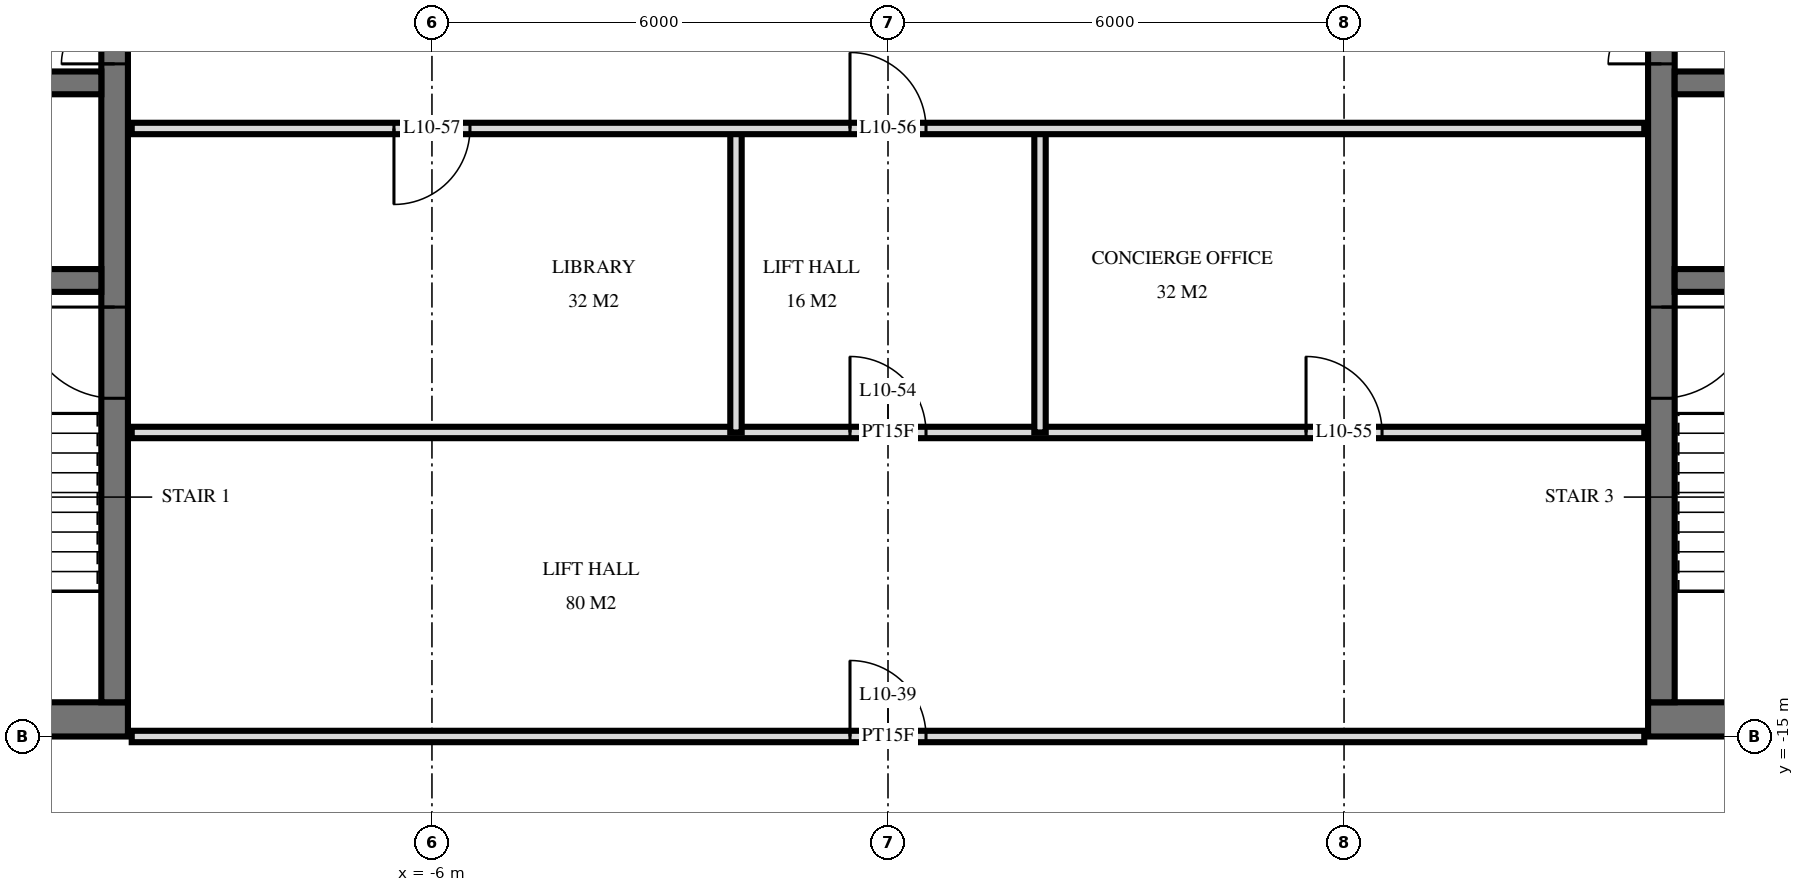
"""IFC4 building model, lengths in metres.
Left out: names, types, materials, properties, quantities, classifications, styles, units other than length and angle.
Written with IfcOpenShell. Run it as: python <this file> out.ifc"""

import sys

from ifc_helpers import new_model, si_unit, direction, frame, frame_2d, origin, place, context, subcontext, project, spatial, rectangle, extrude, element, fill, save


model = new_model("IFC4")
c1 = context("Model", 3, precision=1e-05, world=origin(), true_north=direction((0.0, 1.0)))
c2 = subcontext(c1, "Body", "Model", "MODEL_VIEW")
j1 = project(units=[si_unit("LENGTHUNIT", "METRE"), si_unit("PLANEANGLEUNIT", "RADIAN")], contexts=[c1])
p1 = place(None, origin())
s1 = spatial("IfcSite", under=j1, at=p1, CompositionType="ELEMENT")
p2 = place(p1, origin())
s2 = spatial("IfcBuilding", under=s1, at=p2, CompositionType="ELEMENT")
p3 = place(p2, frame((0.0, 0.0, 45.6)))
s3 = spatial("IfcBuildingStorey", under=s2, at=p3, CompositionType="ELEMENT", Elevation=45.6)
p4 = place(p3, frame((-29.5, -14.775, 0.0), z_axis=(0.0, 0.0, 1.0), x_axis=(1.0, 0.0, 0.0)))
e1 = element("IfcWall", 1, at=p4, inside=s3, PredefinedType="SHEAR", context=c2, shape_type="SweptSolid", body=[
    extrude(rectangle(XDim=19.5, YDim=0.45, at=frame_2d((9.75, 0.0))), origin(), (0.0, 0.0, 1.0), 3.6),
])
p5 = place(p4, frame((11.2, 0.0, 0.0)))
e2 = element("IfcOpeningElement", 2, at=p5, cuts=e1, PredefinedType="OPENING", context=c2, shape_type="SweptSolid", body=[
    extrude(rectangle(XDim=1.2, YDim=2.1, at=frame_2d((0.6, 1.05))), frame((0.0, 0.235, 0.0), z_axis=(0.0, -1.0, 0.0), x_axis=(1.0, 0.0, 0.0)), (0.0, 0.0, 1.0), 0.47),
])
p6 = place(p4, frame((14.25, 0.0, 0.0)))
e3 = element("IfcOpeningElement", 3, at=p6, cuts=e1, PredefinedType="OPENING", context=c2, shape_type="SweptSolid", body=[
    extrude(rectangle(XDim=1.1, YDim=2.1, at=frame_2d((0.55, 1.05))), frame((0.0, 0.235, 0.0), z_axis=(0.0, -1.0, 0.0), x_axis=(1.0, 0.0, 0.0)), (0.0, 0.0, 1.0), 0.47),
])
p7 = place(p4, frame((8.5, 0.0, 0.0)))
e4 = element("IfcOpeningElement", 4, at=p7, cuts=e1, PredefinedType="OPENING", context=c2, shape_type="SweptSolid", body=[
    extrude(rectangle(XDim=0.9, YDim=2.1, at=frame_2d((0.45, 1.05))), frame((0.0, 0.235, 0.0), z_axis=(0.0, -1.0, 0.0), x_axis=(1.0, 0.0, 0.0)), (0.0, 0.0, 1.0), 0.47),
])
p8 = place(p4, frame((6.05, 0.0, 0.0)))
e5 = element("IfcOpeningElement", 5, at=p8, cuts=e1, PredefinedType="OPENING", context=c2, shape_type="SweptSolid", body=[
    extrude(rectangle(XDim=1.0, YDim=2.1, at=frame_2d((0.5, 1.05))), frame((0.0, 0.235, 0.0), z_axis=(0.0, -1.0, 0.0), x_axis=(1.0, 0.0, 0.0)), (0.0, 0.0, 1.0), 0.47),
])
p9 = place(p4, frame((3.587, 0.0, 0.0)))
e6 = element("IfcOpeningElement", 6, at=p9, cuts=e1, PredefinedType="OPENING", context=c2, shape_type="SweptSolid", body=[
    extrude(rectangle(XDim=1.0, YDim=2.1, at=frame_2d((0.5, 1.05))), frame((0.0, 0.235, 0.0), z_axis=(0.0, -1.0, 0.0), x_axis=(1.0, 0.0, 0.0)), (0.0, 0.0, 1.0), 0.47),
])
p10 = place(p4, frame((1.85, 0.0, 0.0)))
e7 = element("IfcOpeningElement", 7, at=p10, cuts=e1, PredefinedType="OPENING", context=c2, shape_type="SweptSolid", body=[
    extrude(rectangle(XDim=1.0, YDim=2.1, at=frame_2d((0.5, 1.05))), frame((0.0, 0.235, 0.0), z_axis=(0.0, -1.0, 0.0), x_axis=(1.0, 0.0, 0.0)), (0.0, 0.0, 1.0), 0.47),
])
p11 = place(p4, frame((0.55, 0.0, 0.0)))
e8 = element("IfcOpeningElement", 8, at=p11, cuts=e1, PredefinedType="OPENING", context=c2, shape_type="SweptSolid", body=[
    extrude(rectangle(XDim=1.0, YDim=2.1, at=frame_2d((0.5, 1.05))), frame((0.0, 0.235, 0.0), z_axis=(0.0, -1.0, 0.0), x_axis=(1.0, 0.0, 0.0)), (0.0, 0.0, 1.0), 0.47),
])
p12 = place(p3, frame((-10.175, -14.55, 0.0), z_axis=(0.0, 0.0, 1.0), x_axis=(0.0, 1.0, 0.0)))
e9 = element("IfcWall", 9, at=p12, inside=s3, PredefinedType="SHEAR", context=c2, shape_type="SweptSolid", body=[
    extrude(rectangle(XDim=14.1, YDim=0.35, at=frame_2d((7.05, 0.0))), origin(), (0.0, 0.0, 1.0), 3.6),
])
p13 = place(p12, frame((8.4, 0.0, 0.0)))
e10 = element("IfcOpeningElement", 10, at=p13, cuts=e9, PredefinedType="OPENING", context=c2, shape_type="SweptSolid", body=[
    extrude(rectangle(XDim=1.4, YDim=2.4, at=frame_2d((0.7, 1.2))), frame((0.0, 0.185, 0.0), z_axis=(0.0, -1.0, 0.0), x_axis=(1.0, 0.0, 0.0)), (0.0, 0.0, 1.0), 0.37),
])
p14 = place(p12, frame((10.0, 0.0, 0.0)))
e11 = element("IfcOpeningElement", 11, at=p14, cuts=e9, PredefinedType="OPENING", context=c2, shape_type="SweptSolid", body=[
    extrude(rectangle(XDim=1.4, YDim=2.4, at=frame_2d((0.7, 1.2))), frame((0.0, 0.185, 0.0), z_axis=(0.0, -1.0, 0.0), x_axis=(1.0, 0.0, 0.0)), (0.0, 0.0, 1.0), 0.37),
])
p15 = place(p12, frame((4.0, 0.0, 0.0)))
e12 = element("IfcOpeningElement", 12, at=p15, cuts=e9, PredefinedType="OPENING", context=c2, shape_type="SweptSolid", body=[
    extrude(rectangle(XDim=1.2, YDim=2.1, at=frame_2d((0.6, 1.05))), frame((0.0, 0.185, 0.0), z_axis=(0.0, -1.0, 0.0), x_axis=(1.0, 0.0, 0.0)), (0.0, 0.0, 1.0), 0.37),
])
p16 = place(p3, frame((-29.05, -6.4, 0.0), z_axis=(0.0, 0.0, 1.0), x_axis=(1.0, 0.0, 0.0)))
e13 = element("IfcWall", 13, at=p16, inside=s3, PredefinedType="SHEAR", context=c2, shape_type="SweptSolid", body=[
    extrude(rectangle(XDim=18.7, YDim=0.3, at=frame_2d((9.35, 0.0))), origin(), (0.0, 0.0, 1.0), 3.6),
])
p17 = place(p16, frame((2.95, 0.0, 0.0)))
e14 = element("IfcOpeningElement", 14, at=p17, cuts=e13, PredefinedType="OPENING", context=c2, shape_type="SweptSolid", body=[
    extrude(rectangle(XDim=1.1, YDim=2.1, at=frame_2d((0.55, 1.05))), frame((0.0, 0.16, 0.0), z_axis=(0.0, -1.0, 0.0), x_axis=(1.0, 0.0, 0.0)), (0.0, 0.0, 1.0), 0.32),
])
p18 = place(p16, frame((0.55, 0.0, 0.0)))
e15 = element("IfcOpeningElement", 15, at=p18, cuts=e13, PredefinedType="OPENING", context=c2, shape_type="SweptSolid", body=[
    extrude(rectangle(XDim=1.1, YDim=2.1, at=frame_2d((0.55, 1.05))), frame((0.0, 0.16, 0.0), z_axis=(0.0, -1.0, 0.0), x_axis=(1.0, 0.0, 0.0)), (0.0, 0.0, 1.0), 0.32),
])
p19 = place(p16, frame((10.8, 0.0, 0.0)))
e16 = element("IfcOpeningElement", 16, at=p19, cuts=e13, PredefinedType="OPENING", context=c2, shape_type="SweptSolid", body=[
    extrude(rectangle(XDim=1.1, YDim=2.1, at=frame_2d((0.55, 1.05))), frame((0.0, 0.16, 0.0), z_axis=(0.0, -1.0, 0.0), x_axis=(1.0, 0.0, 0.0)), (0.0, 0.0, 1.0), 0.32),
])
p20 = place(p16, frame((5.6, 0.0, 0.0)))
e17 = element("IfcOpeningElement", 17, at=p20, cuts=e13, PredefinedType="OPENING", context=c2, shape_type="SweptSolid", body=[
    extrude(rectangle(XDim=1.0, YDim=2.1, at=frame_2d((0.5, 1.05))), frame((0.0, 0.16, 0.0), z_axis=(0.0, -1.0, 0.0), x_axis=(1.0, 0.0, 0.0)), (0.0, 0.0, 1.0), 0.32),
])
p21 = place(p3, frame((-29.05, -9.0, 0.0), z_axis=(0.0, 0.0, 1.0), x_axis=(1.0, 0.0, 0.0)))
e18 = element("IfcWall", 18, at=p21, inside=s3, PredefinedType="SHEAR", context=c2, shape_type="SweptSolid", body=[
    extrude(rectangle(XDim=18.7, YDim=0.3, at=frame_2d((9.35, 0.0))), origin(), (0.0, 0.0, 1.0), 3.6),
])
p22 = place(p21, frame((13.8, 0.0, 0.0)))
e19 = element("IfcOpeningElement", 19, at=p22, cuts=e18, PredefinedType="OPENING", context=c2, shape_type="SweptSolid", body=[
    extrude(rectangle(XDim=1.1, YDim=2.1, at=frame_2d((0.55, 1.05))), frame((0.0, 0.16, 0.0), z_axis=(0.0, -1.0, 0.0), x_axis=(1.0, 0.0, 0.0)), (0.0, 0.0, 1.0), 0.32),
])
p23 = place(p3, frame((10.0, -14.775, 0.0), z_axis=(0.0, 0.0, 1.0), x_axis=(1.0, 0.0, 0.0)))
e20 = element("IfcWall", 20, at=p23, inside=s3, PredefinedType="SHEAR", context=c2, shape_type="SweptSolid", body=[
    extrude(rectangle(XDim=19.5, YDim=0.45, at=frame_2d((9.75, 0.0))), origin(), (0.0, 0.0, 1.0), 3.6),
])
p24 = place(p23, frame((7.1, 0.0, 0.0)))
e21 = element("IfcOpeningElement", 21, at=p24, cuts=e20, PredefinedType="OPENING", context=c2, shape_type="SweptSolid", body=[
    extrude(rectangle(XDim=1.2, YDim=2.1, at=frame_2d((0.6, 1.05))), frame((0.0, 0.235, 0.0), z_axis=(0.0, -1.0, 0.0), x_axis=(1.0, 0.0, 0.0)), (0.0, 0.0, 1.0), 0.47),
])
p25 = place(p23, frame((4.15, 0.0, 0.0)))
e22 = element("IfcOpeningElement", 22, at=p25, cuts=e20, PredefinedType="OPENING", context=c2, shape_type="SweptSolid", body=[
    extrude(rectangle(XDim=1.1, YDim=2.1, at=frame_2d((0.55, 1.05))), frame((0.0, 0.235, 0.0), z_axis=(0.0, -1.0, 0.0), x_axis=(1.0, 0.0, 0.0)), (0.0, 0.0, 1.0), 0.47),
])
p26 = place(p23, frame((10.1, 0.0, 0.0)))
e23 = element("IfcOpeningElement", 23, at=p26, cuts=e20, PredefinedType="OPENING", context=c2, shape_type="SweptSolid", body=[
    extrude(rectangle(XDim=0.9, YDim=2.1, at=frame_2d((0.45, 1.05))), frame((0.0, 0.235, 0.0), z_axis=(0.0, -1.0, 0.0), x_axis=(1.0, 0.0, 0.0)), (0.0, 0.0, 1.0), 0.47),
])
p27 = place(p23, frame((12.45, 0.0, 0.0)))
e24 = element("IfcOpeningElement", 24, at=p27, cuts=e20, PredefinedType="OPENING", context=c2, shape_type="SweptSolid", body=[
    extrude(rectangle(XDim=1.0, YDim=2.1, at=frame_2d((0.5, 1.05))), frame((0.0, 0.235, 0.0), z_axis=(0.0, -1.0, 0.0), x_axis=(1.0, 0.0, 0.0)), (0.0, 0.0, 1.0), 0.47),
])
p28 = place(p23, frame((14.913, 0.0, 0.0)))
e25 = element("IfcOpeningElement", 25, at=p28, cuts=e20, PredefinedType="OPENING", context=c2, shape_type="SweptSolid", body=[
    extrude(rectangle(XDim=1.0, YDim=2.1, at=frame_2d((0.5, 1.05))), frame((0.0, 0.235, 0.0), z_axis=(0.0, -1.0, 0.0), x_axis=(1.0, 0.0, 0.0)), (0.0, 0.0, 1.0), 0.47),
])
p29 = place(p23, frame((16.65, 0.0, 0.0)))
e26 = element("IfcOpeningElement", 26, at=p29, cuts=e20, PredefinedType="OPENING", context=c2, shape_type="SweptSolid", body=[
    extrude(rectangle(XDim=1.0, YDim=2.1, at=frame_2d((0.5, 1.05))), frame((0.0, 0.235, 0.0), z_axis=(0.0, -1.0, 0.0), x_axis=(1.0, 0.0, 0.0)), (0.0, 0.0, 1.0), 0.47),
])
p30 = place(p23, frame((18.025, 0.0, 0.0)))
e27 = element("IfcOpeningElement", 27, at=p30, cuts=e20, PredefinedType="OPENING", context=c2, shape_type="SweptSolid", body=[
    extrude(rectangle(XDim=1.0, YDim=2.1, at=frame_2d((0.5, 1.05))), frame((0.0, 0.235, 0.0), z_axis=(0.0, -1.0, 0.0), x_axis=(1.0, 0.0, 0.0)), (0.0, 0.0, 1.0), 0.47),
])
p31 = place(p3, frame((10.175, -14.55, 0.0), z_axis=(0.0, 0.0, 1.0), x_axis=(0.0, 1.0, 0.0)))
e28 = element("IfcWall", 28, at=p31, inside=s3, PredefinedType="SHEAR", context=c2, shape_type="SweptSolid", body=[
    extrude(rectangle(XDim=14.1, YDim=0.35, at=frame_2d((7.05, 0.0))), origin(), (0.0, 0.0, 1.0), 3.6),
])
p32 = place(p31, frame((8.4, 0.0, 0.0)))
e29 = element("IfcOpeningElement", 29, at=p32, cuts=e28, PredefinedType="OPENING", context=c2, shape_type="SweptSolid", body=[
    extrude(rectangle(XDim=1.4, YDim=2.4, at=frame_2d((0.7, 1.2))), frame((0.0, 0.185, 0.0), z_axis=(0.0, -1.0, 0.0), x_axis=(1.0, 0.0, 0.0)), (0.0, 0.0, 1.0), 0.37),
])
p33 = place(p31, frame((10.0, 0.0, 0.0)))
e30 = element("IfcOpeningElement", 30, at=p33, cuts=e28, PredefinedType="OPENING", context=c2, shape_type="SweptSolid", body=[
    extrude(rectangle(XDim=1.4, YDim=2.4, at=frame_2d((0.7, 1.2))), frame((0.0, 0.185, 0.0), z_axis=(0.0, -1.0, 0.0), x_axis=(1.0, 0.0, 0.0)), (0.0, 0.0, 1.0), 0.37),
])
p34 = place(p31, frame((4.0, 0.0, 0.0)))
e31 = element("IfcOpeningElement", 31, at=p34, cuts=e28, PredefinedType="OPENING", context=c2, shape_type="SweptSolid", body=[
    extrude(rectangle(XDim=1.2, YDim=2.1, at=frame_2d((0.6, 1.05))), frame((0.0, 0.185, 0.0), z_axis=(0.0, -1.0, 0.0), x_axis=(1.0, 0.0, 0.0)), (0.0, 0.0, 1.0), 0.37),
])
p35 = place(p3, frame((10.35, -6.4, 0.0), z_axis=(0.0, 0.0, 1.0), x_axis=(1.0, 0.0, 0.0)))
e32 = element("IfcWall", 32, at=p35, inside=s3, PredefinedType="SHEAR", context=c2, shape_type="SweptSolid", body=[
    extrude(rectangle(XDim=18.7, YDim=0.3, at=frame_2d((9.35, 0.0))), origin(), (0.0, 0.0, 1.0), 3.6),
])
p36 = place(p35, frame((14.65, 0.0, 0.0)))
e33 = element("IfcOpeningElement", 33, at=p36, cuts=e32, PredefinedType="OPENING", context=c2, shape_type="SweptSolid", body=[
    extrude(rectangle(XDim=1.1, YDim=2.1, at=frame_2d((0.55, 1.05))), frame((0.0, 0.16, 0.0), z_axis=(0.0, -1.0, 0.0), x_axis=(1.0, 0.0, 0.0)), (0.0, 0.0, 1.0), 0.32),
])
p37 = place(p35, frame((17.05, 0.0, 0.0)))
e34 = element("IfcOpeningElement", 34, at=p37, cuts=e32, PredefinedType="OPENING", context=c2, shape_type="SweptSolid", body=[
    extrude(rectangle(XDim=1.1, YDim=2.1, at=frame_2d((0.55, 1.05))), frame((0.0, 0.16, 0.0), z_axis=(0.0, -1.0, 0.0), x_axis=(1.0, 0.0, 0.0)), (0.0, 0.0, 1.0), 0.32),
])
p38 = place(p35, frame((6.8, 0.0, 0.0)))
e35 = element("IfcOpeningElement", 35, at=p38, cuts=e32, PredefinedType="OPENING", context=c2, shape_type="SweptSolid", body=[
    extrude(rectangle(XDim=1.1, YDim=2.1, at=frame_2d((0.55, 1.05))), frame((0.0, 0.16, 0.0), z_axis=(0.0, -1.0, 0.0), x_axis=(1.0, 0.0, 0.0)), (0.0, 0.0, 1.0), 0.32),
])
p39 = place(p35, frame((12.1, 0.0, 0.0)))
e36 = element("IfcOpeningElement", 36, at=p39, cuts=e32, PredefinedType="OPENING", context=c2, shape_type="SweptSolid", body=[
    extrude(rectangle(XDim=1.0, YDim=2.1, at=frame_2d((0.5, 1.05))), frame((0.0, 0.16, 0.0), z_axis=(0.0, -1.0, 0.0), x_axis=(1.0, 0.0, 0.0)), (0.0, 0.0, 1.0), 0.32),
])
p40 = place(p3, frame((10.35, -9.0, 0.0), z_axis=(0.0, 0.0, 1.0), x_axis=(1.0, 0.0, 0.0)))
e37 = element("IfcWall", 37, at=p40, inside=s3, PredefinedType="SHEAR", context=c2, shape_type="SweptSolid", body=[
    extrude(rectangle(XDim=18.7, YDim=0.3, at=frame_2d((9.35, 0.0))), origin(), (0.0, 0.0, 1.0), 3.6),
])
p41 = place(p40, frame((3.8, 0.0, 0.0)))
e38 = element("IfcOpeningElement", 38, at=p41, cuts=e37, PredefinedType="OPENING", context=c2, shape_type="SweptSolid", body=[
    extrude(rectangle(XDim=1.1, YDim=2.1, at=frame_2d((0.55, 1.05))), frame((0.0, 0.16, 0.0), z_axis=(0.0, -1.0, 0.0), x_axis=(1.0, 0.0, 0.0)), (0.0, 0.0, 1.0), 0.32),
])
for number, where, z_axis, x_axis in (
    (39, (2.0, -11.0, 0.0), (0.0, 0.0, 1.0), (0.0, 1.0, 0.0)),
    (40, (-2.0, -11.0, 0.0), (0.0, 0.0, 1.0), (0.0, 1.0, 0.0)),
):
    element("IfcWall", number, at=place(p3, frame(where, z_axis=z_axis, x_axis=x_axis)), inside=s3, PredefinedType="PARTITIONING", context=c2, shape_type="SweptSolid", body=[
        extrude(rectangle(XDim=4.0, YDim=0.15, at=frame_2d((2.0, 0.0))), origin(), (0.0, 0.0, 1.0), 3.32),
    ])
p42 = place(p3, frame((-9.95, -15.0, 0.0), z_axis=(0.0, 0.0, 1.0), x_axis=(1.0, 0.0, 0.0)))
e41 = element("IfcWall", 41, at=p42, inside=s3, PredefinedType="PARTITIONING", context=c2, shape_type="SweptSolid", body=[
    extrude(rectangle(XDim=19.9, YDim=0.15, at=frame_2d((9.95, 0.0))), origin(), (0.0, 0.0, 1.0), 2.684),
])
p43 = place(p42, frame((9.45, 0.0, 0.0)))
e42 = element("IfcOpeningElement", 42, at=p43, cuts=e41, PredefinedType="OPENING", context=c2, shape_type="SweptSolid", body=[
    extrude(rectangle(XDim=1.0, YDim=2.1, at=frame_2d((0.5, 1.05))), frame((0.0, 0.085, 0.0), z_axis=(0.0, -1.0, 0.0), x_axis=(1.0, 0.0, 0.0)), (0.0, 0.0, 1.0), 0.17),
])
p44 = place(p3, frame((-9.95, -11.0, 0.0), z_axis=(0.0, 0.0, 1.0), x_axis=(1.0, 0.0, 0.0)))
e43 = element("IfcWall", 43, at=p44, inside=s3, PredefinedType="PARTITIONING", context=c2, shape_type="SweptSolid", body=[
    extrude(rectangle(XDim=19.9, YDim=0.15, at=frame_2d((9.95, 0.0))), origin(), (0.0, 0.0, 1.0), 3.32),
])
p45 = place(p44, frame((9.45, 0.0, 0.0)))
e44 = element("IfcOpeningElement", 44, at=p45, cuts=e43, PredefinedType="OPENING", context=c2, shape_type="SweptSolid", body=[
    extrude(rectangle(XDim=1.0, YDim=2.1, at=frame_2d((0.5, 1.05))), frame((0.0, 0.085, 0.0), z_axis=(0.0, -1.0, 0.0), x_axis=(1.0, 0.0, 0.0)), (0.0, 0.0, 1.0), 0.17),
])
p46 = place(p44, frame((15.45, 0.0, 0.0)))
e45 = element("IfcOpeningElement", 45, at=p46, cuts=e43, PredefinedType="OPENING", context=c2, shape_type="SweptSolid", body=[
    extrude(rectangle(XDim=1.0, YDim=2.1, at=frame_2d((0.5, 1.05))), frame((0.0, 0.085, 0.0), z_axis=(0.0, -1.0, 0.0), x_axis=(1.0, 0.0, 0.0)), (0.0, 0.0, 1.0), 0.17),
])
p47 = place(p3, frame((-9.95, -7.0, 0.0), z_axis=(0.0, 0.0, 1.0), x_axis=(1.0, 0.0, 0.0)))
e46 = element("IfcWall", 46, at=p47, inside=s3, PredefinedType="PARTITIONING", context=c2, shape_type="SweptSolid", body=[
    extrude(rectangle(XDim=19.9, YDim=0.15, at=frame_2d((9.95, 0.0))), origin(), (0.0, 0.0, 1.0), 3.32),
])
p48 = place(p47, frame((9.45, 0.0, 0.0)))
e47 = element("IfcOpeningElement", 47, at=p48, cuts=e46, PredefinedType="OPENING", context=c2, shape_type="SweptSolid", body=[
    extrude(rectangle(XDim=1.0, YDim=2.1, at=frame_2d((0.5, 1.05))), frame((0.0, 0.085, 0.0), z_axis=(0.0, -1.0, 0.0), x_axis=(1.0, 0.0, 0.0)), (0.0, 0.0, 1.0), 0.17),
])
p49 = place(p47, frame((3.45, 0.0, 0.0)))
e48 = element("IfcOpeningElement", 48, at=p49, cuts=e46, PredefinedType="OPENING", context=c2, shape_type="SweptSolid", body=[
    extrude(rectangle(XDim=1.0, YDim=2.1, at=frame_2d((0.5, 1.05))), frame((0.0, 0.085, 0.0), z_axis=(0.0, -1.0, 0.0), x_axis=(1.0, 0.0, 0.0)), (0.0, 0.0, 1.0), 0.17),
])
p50 = place(p13, origin())
e49 = element("IfcDoor", 49, at=p50, inside=s3, OperationType="DOUBLE_DOOR_SINGLE_SWING", PredefinedType="DOOR", context=c2, shape_type="SweptSolid", body=[
    extrude(rectangle(XDim=1.4, YDim=2.4, at=frame_2d((0.7, 1.2))), frame((0.0, 0.025, 0.0), z_axis=(0.0, -1.0, 0.0), x_axis=(1.0, 0.0, 0.0)), (0.0, 0.0, 1.0), 0.05),
])
fill(e10, e49)
p51 = place(p15, origin())
e50 = element("IfcDoor", 50, at=p51, inside=s3, OperationType="SINGLE_SWING_LEFT", PredefinedType="DOOR", context=c2, shape_type="SweptSolid", body=[
    extrude(rectangle(XDim=1.2, YDim=2.1, at=frame_2d((0.6, 1.05))), frame((0.0, 0.025, 0.0), z_axis=(0.0, -1.0, 0.0), x_axis=(1.0, 0.0, 0.0)), (0.0, 0.0, 1.0), 0.05),
])
fill(e12, e50)
p52 = place(p32, origin())
e51 = element("IfcDoor", 51, at=p52, inside=s3, OperationType="DOUBLE_DOOR_SINGLE_SWING", PredefinedType="DOOR", context=c2, shape_type="SweptSolid", body=[
    extrude(rectangle(XDim=1.4, YDim=2.4, at=frame_2d((0.7, 1.2))), frame((0.0, 0.025, 0.0), z_axis=(0.0, -1.0, 0.0), x_axis=(1.0, 0.0, 0.0)), (0.0, 0.0, 1.0), 0.05),
])
fill(e29, e51)
p53 = place(p34, frame((0.6, 0.0, 0.0), z_axis=(0.0, 0.0, 1.0), x_axis=(-1.0, 0.0, 0.0)))
e52 = element("IfcDoor", 52, at=p53, inside=s3, OperationType="SINGLE_SWING_RIGHT", PredefinedType="DOOR", context=c2, shape_type="SweptSolid", body=[
    extrude(rectangle(XDim=1.2, YDim=2.1, at=frame_2d((0.0, 1.05))), frame((0.0, -0.025, 0.0), z_axis=(0.0, 1.0, 0.0), x_axis=(-1.0, 0.0, 0.0)), (0.0, 0.0, 1.0), 0.05),
])
fill(e31, e52)
p54 = place(p43, origin())
e53 = element("IfcDoor", 53, at=p54, inside=s3, OperationType="SINGLE_SWING_RIGHT", PredefinedType="DOOR", context=c2, shape_type="SweptSolid", body=[
    extrude(rectangle(XDim=1.0, YDim=2.1, at=frame_2d((0.5, 1.05))), frame((0.0, 0.025, 0.0), z_axis=(0.0, -1.0, 0.0), x_axis=(1.0, 0.0, 0.0)), (0.0, 0.0, 1.0), 0.05),
])
fill(e42, e53)
p55 = place(p45, origin())
e54 = element("IfcDoor", 54, at=p55, inside=s3, OperationType="SINGLE_SWING_RIGHT", PredefinedType="DOOR", context=c2, shape_type="SweptSolid", body=[
    extrude(rectangle(XDim=1.0, YDim=2.1, at=frame_2d((0.5, 1.05))), frame((0.0, 0.025, 0.0), z_axis=(0.0, -1.0, 0.0), x_axis=(1.0, 0.0, 0.0)), (0.0, 0.0, 1.0), 0.05),
])
fill(e44, e54)
p56 = place(p46, origin())
e55 = element("IfcDoor", 55, at=p56, inside=s3, OperationType="SINGLE_SWING_RIGHT", PredefinedType="DOOR", context=c2, shape_type="SweptSolid", body=[
    extrude(rectangle(XDim=1.0, YDim=2.1, at=frame_2d((0.5, 1.05))), frame((0.0, 0.025, 0.0), z_axis=(0.0, -1.0, 0.0), x_axis=(1.0, 0.0, 0.0)), (0.0, 0.0, 1.0), 0.05),
])
fill(e45, e55)
p57 = place(p48, origin())
e56 = element("IfcDoor", 56, at=p57, inside=s3, OperationType="SINGLE_SWING_RIGHT", PredefinedType="DOOR", context=c2, shape_type="SweptSolid", body=[
    extrude(rectangle(XDim=1.0, YDim=2.1, at=frame_2d((0.5, 1.05))), frame((0.0, 0.025, 0.0), z_axis=(0.0, -1.0, 0.0), x_axis=(1.0, 0.0, 0.0)), (0.0, 0.0, 1.0), 0.05),
])
fill(e47, e56)
p58 = place(p49, frame((0.5, 0.0, 0.0), z_axis=(0.0, 0.0, 1.0), x_axis=(-1.0, 0.0, 0.0)))
e57 = element("IfcDoor", 57, at=p58, inside=s3, OperationType="SINGLE_SWING_LEFT", PredefinedType="DOOR", context=c2, shape_type="SweptSolid", body=[
    extrude(rectangle(XDim=1.0, YDim=2.1, at=frame_2d((0.0, 1.05))), frame((0.0, -0.025, 0.0), z_axis=(0.0, 1.0, 0.0), x_axis=(-1.0, 0.0, 0.0)), (0.0, 0.0, 1.0), 0.05),
])
fill(e48, e57)
save(model, sys.argv[1])
